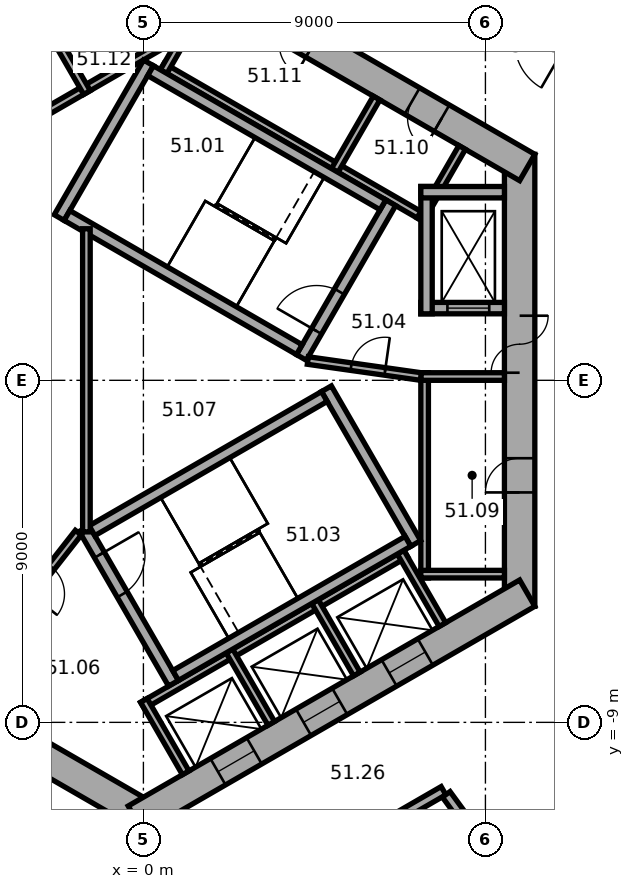
"""IFC4 building model, lengths in metres.
Left out: names, types, materials, properties, quantities, classifications, styles, units other than length and angle.
Written with IfcOpenShell. Run it as: python <this file> out.ifc"""

import sys

from ifc_helpers import new_model, si_unit, direction, frame, frame_2d, origin, place, context, subcontext, project, spatial, rectangle, extrude, element, fill, save


model = new_model("IFC4")
c1 = context("Model", 3, precision=1e-05, world=origin(), true_north=direction((0.0, 1.0)))
c2 = subcontext(c1, "Body", "Model", "MODEL_VIEW")
j1 = project(units=[si_unit("LENGTHUNIT", "METRE"), si_unit("PLANEANGLEUNIT", "RADIAN")], contexts=[c1])
p1 = place(None, origin())
s1 = spatial("IfcSite", under=j1, at=p1, CompositionType="ELEMENT")
p2 = place(p1, origin())
s2 = spatial("IfcBuilding", under=s1, at=p2, CompositionType="ELEMENT")
p3 = place(p2, frame((0.0, 0.0, 205.8)))
s3 = spatial("IfcBuildingStorey", under=s2, at=p3, CompositionType="ELEMENT", Elevation=205.8)
p4 = place(p3, frame((9.9, -5.947, 0.0), z_axis=(0.0, 0.0, 1.0), x_axis=(0.0, 1.0, 0.0)))
e1 = element("IfcWall", 1, at=p4, inside=s3, PredefinedType="SHEAR", context=c2, shape_type="SweptSolid", body=[
    extrude(rectangle(XDim=11.894, YDim=0.8, at=frame_2d((5.947, 0.0))), origin(), (0.0, 0.0, 1.0), 4.8),
])
p5 = place(p4, frame((6.147, 0.0, 0.0)))
e2 = element("IfcOpeningElement", 2, at=p5, cuts=e1, PredefinedType="OPENING", context=c2, shape_type="SweptSolid", body=[
    extrude(rectangle(XDim=1.5, YDim=2.1, at=frame_2d((0.75, 1.05))), frame((0.0, 0.41, 0.0), z_axis=(0.0, -1.0, 0.0), x_axis=(1.0, 0.0, 0.0)), (0.0, 0.0, 1.0), 0.82),
])
p6 = place(p4, frame((2.997, 0.0, 0.0)))
e3 = element("IfcOpeningElement", 3, at=p6, cuts=e1, PredefinedType="OPENING", context=c2, shape_type="SweptSolid", body=[
    extrude(rectangle(XDim=0.9, YDim=2.1, at=frame_2d((0.45, 1.05))), frame((0.0, 0.41, 0.0), z_axis=(0.0, -1.0, 0.0), x_axis=(1.0, 0.0, 0.0)), (0.0, 0.0, 1.0), 0.82),
])
p7 = place(p3, frame((10.1, 5.6, 0.0), z_axis=(0.0, 0.0, 1.0), x_axis=(-0.866023897231, 0.500002609418, 0.0)))
e4 = element("IfcWall", 4, at=p7, inside=s3, PredefinedType="SHEAR", context=c2, shape_type="SweptSolid", body=[
    extrude(rectangle(XDim=11.894, YDim=0.8, at=frame_2d((5.947, 0.0))), origin(), (0.0, 0.0, 1.0), 4.8),
])
p8 = place(p7, frame((2.597, 0.0, 0.0)))
e5 = element("IfcOpeningElement", 5, at=p8, cuts=e4, PredefinedType="OPENING", context=c2, shape_type="SweptSolid", body=[
    extrude(rectangle(XDim=0.9, YDim=2.1, at=frame_2d((0.45, 1.05))), frame((0.0, 0.41, 0.0), z_axis=(0.0, -1.0, 0.0), x_axis=(1.0, 0.0, 0.0)), (0.0, 0.0, 1.0), 0.82),
])
p9 = place(p7, frame((6.497, 0.0, 0.0)))
e6 = element("IfcOpeningElement", 6, at=p9, cuts=e4, PredefinedType="OPENING", context=c2, shape_type="SweptSolid", body=[
    extrude(rectangle(XDim=0.9, YDim=2.1, at=frame_2d((0.45, 1.05))), frame((0.0, 0.41, 0.0), z_axis=(0.0, -1.0, 0.0), x_axis=(1.0, 0.0, 0.0)), (0.0, 0.0, 1.0), 0.82),
])
p10 = place(p3, frame((0.2, 11.547, 0.0), z_axis=(0.0, 0.0, 1.0), x_axis=(-0.866023897231, -0.500002609418, 0.0)))
e7 = element("IfcWall", 7, at=p10, inside=s3, PredefinedType="SHEAR", context=c2, shape_type="SweptSolid", body=[
    extrude(rectangle(XDim=11.894, YDim=0.8, at=frame_2d((5.947, 0.0))), origin(), (0.0, 0.0, 1.0), 4.8),
])
p11 = place(p10, frame((6.147, 0.0, 0.0)))
e8 = element("IfcOpeningElement", 8, at=p11, cuts=e7, PredefinedType="OPENING", context=c2, shape_type="SweptSolid", body=[
    extrude(rectangle(XDim=1.5, YDim=2.1, at=frame_2d((0.75, 1.05))), frame((0.0, 0.41, 0.0), z_axis=(0.0, -1.0, 0.0), x_axis=(1.0, 0.0, 0.0)), (0.0, 0.0, 1.0), 0.82),
])
p12 = place(p10, frame((1.697, 0.0, 0.0)))
e9 = element("IfcOpeningElement", 9, at=p12, cuts=e7, PredefinedType="OPENING", context=c2, shape_type="SweptSolid", body=[
    extrude(rectangle(XDim=0.9, YDim=2.1, at=frame_2d((0.45, 1.05))), frame((0.0, 0.41, 0.0), z_axis=(0.0, -1.0, 0.0), x_axis=(1.0, 0.0, 0.0)), (0.0, 0.0, 1.0), 0.82),
])
p13 = place(p10, frame((4.297, 0.0, 0.0)))
e10 = element("IfcOpeningElement", 10, at=p13, cuts=e7, PredefinedType="OPENING", context=c2, shape_type="SweptSolid", body=[
    extrude(rectangle(XDim=0.9, YDim=2.1, at=frame_2d((0.45, 1.05))), frame((0.0, 0.41, 0.0), z_axis=(0.0, -1.0, 0.0), x_axis=(1.0, 0.0, 0.0)), (0.0, 0.0, 1.0), 0.82),
])
p14 = place(p3, frame((-10.1, -5.6, 0.0), z_axis=(0.0, 0.0, 1.0), x_axis=(0.866023897231, -0.500002609418, 0.0)))
e11 = element("IfcWall", 11, at=p14, inside=s3, PredefinedType="SHEAR", context=c2, shape_type="SweptSolid", body=[
    extrude(rectangle(XDim=11.894, YDim=0.8, at=frame_2d((5.947, 0.0))), origin(), (0.0, 0.0, 1.0), 4.8),
])
p15 = place(p14, frame((6.147, 0.0, 0.0)))
e12 = element("IfcOpeningElement", 12, at=p15, cuts=e11, PredefinedType="OPENING", context=c2, shape_type="SweptSolid", body=[
    extrude(rectangle(XDim=1.5, YDim=2.1, at=frame_2d((0.75, 1.05))), frame((0.0, 0.41, 0.0), z_axis=(0.0, -1.0, 0.0), x_axis=(1.0, 0.0, 0.0)), (0.0, 0.0, 1.0), 0.82),
])
p16 = place(p14, frame((1.597, 0.0, 0.0)))
e13 = element("IfcOpeningElement", 13, at=p16, cuts=e11, PredefinedType="OPENING", context=c2, shape_type="SweptSolid", body=[
    extrude(rectangle(XDim=1.1, YDim=2.1, at=frame_2d((0.55, 1.05))), frame((0.0, 0.41, 0.0), z_axis=(0.0, -1.0, 0.0), x_axis=(1.0, 0.0, 0.0)), (0.0, 0.0, 1.0), 0.82),
])
p17 = place(p14, frame((4.197, 0.0, 0.0)))
e14 = element("IfcOpeningElement", 14, at=p17, cuts=e11, PredefinedType="OPENING", context=c2, shape_type="SweptSolid", body=[
    extrude(rectangle(XDim=1.1, YDim=2.1, at=frame_2d((0.55, 1.05))), frame((0.0, 0.41, 0.0), z_axis=(0.0, -1.0, 0.0), x_axis=(1.0, 0.0, 0.0)), (0.0, 0.0, 1.0), 0.82),
])
p18 = place(p3, frame((-0.2, -11.547, 0.0), z_axis=(0.0, 0.0, 1.0), x_axis=(0.866023897231, 0.500002609418, 0.0)))
e15 = element("IfcWall", 15, at=p18, inside=s3, PredefinedType="SHEAR", context=c2, shape_type="SweptSolid", body=[
    extrude(rectangle(XDim=11.894, YDim=0.8, at=frame_2d((5.947, 0.0))), origin(), (0.0, 0.0, 1.0), 4.8),
])
p19 = place(p18, frame((2.497, 0.0, 0.0)))
e16 = element("IfcOpeningElement", 16, at=p19, cuts=e15, PredefinedType="OPENING", context=c2, shape_type="SweptSolid", body=[
    extrude(rectangle(XDim=1.1, YDim=2.1, at=frame_2d((0.55, 1.05))), frame((0.0, 0.41, 0.0), z_axis=(0.0, -1.0, 0.0), x_axis=(1.0, 0.0, 0.0)), (0.0, 0.0, 1.0), 0.82),
])
p20 = place(p18, frame((5.097, 0.0, 0.0)))
e17 = element("IfcOpeningElement", 17, at=p20, cuts=e15, PredefinedType="OPENING", context=c2, shape_type="SweptSolid", body=[
    extrude(rectangle(XDim=1.1, YDim=2.1, at=frame_2d((0.55, 1.05))), frame((0.0, 0.41, 0.0), z_axis=(0.0, -1.0, 0.0), x_axis=(1.0, 0.0, 0.0)), (0.0, 0.0, 1.0), 0.82),
])
p21 = place(p18, frame((7.697, 0.0, 0.0)))
e18 = element("IfcOpeningElement", 18, at=p21, cuts=e15, PredefinedType="OPENING", context=c2, shape_type="SweptSolid", body=[
    extrude(rectangle(XDim=1.1, YDim=2.1, at=frame_2d((0.55, 1.05))), frame((0.0, 0.41, 0.0), z_axis=(0.0, -1.0, 0.0), x_axis=(1.0, 0.0, 0.0)), (0.0, 0.0, 1.0), 0.82),
])
p22 = place(p3, frame((7.4, -5.2, 0.0), z_axis=(0.0, 0.0, 1.0), x_axis=(0.0, 1.0, 0.0)))
e19 = element("IfcWall", 19, at=p22, inside=s3, PredefinedType="PARTITIONING", context=c2, shape_type="SweptSolid", body=[
    extrude(rectangle(XDim=5.4, YDim=0.2, at=frame_2d((2.7, 0.0))), origin(), (0.0, 0.0, 1.0), 4.52),
])
for number, where, z_axis, x_axis in (
    (20, (7.3, -5.1, 0.0), (0.0, 0.0, 1.0), (1.0, 0.0, 0.0)),
    (21, (7.3, 0.1, 0.0), (0.0, 0.0, 1.0), (1.0, 0.0, 0.0)),
):
    element("IfcWall", number, at=place(p3, frame(where, z_axis=z_axis, x_axis=x_axis)), inside=s3, PredefinedType="PARTITIONING", context=c2, shape_type="SweptSolid", body=[
        extrude(rectangle(XDim=2.2, YDim=0.2, at=frame_2d((1.1, 0.0))), origin(), (0.0, 0.0, 1.0), 4.52),
    ])
p23 = place(p3, frame((7.424, 4.259, 0.0), z_axis=(0.0, 0.0, 1.0), x_axis=(-0.866026010844, 0.49999894854, 0.0)))
e22 = element("IfcWall", 22, at=p23, inside=s3, PredefinedType="PARTITIONING", context=c2, shape_type="SweptSolid", body=[
    extrude(rectangle(XDim=8.0, YDim=0.2, at=frame_2d((4.0, 0.0))), origin(), (0.0, 0.0, 1.0), 4.52),
])
for number, where, z_axis, x_axis in (
    (23, (7.287, 4.222, 0.0), (0.0, 0.0, 1.0), (0.5, 0.866, 0.0)),
    (24, (5.036, 5.522, 0.0), (0.0, 0.0, 1.0), (0.5, 0.866, 0.0)),
    (25, (0.532, 8.122, 0.0), (0.0, 0.0, 1.0), (0.5, 0.866, 0.0)),
):
    element("IfcWall", number, at=place(p3, frame(where, z_axis=z_axis, x_axis=x_axis)), inside=s3, PredefinedType="PARTITIONING", context=c2, shape_type="SweptSolid", body=[
        extrude(rectangle(XDim=2.2, YDim=0.2, at=frame_2d((1.1, 0.0))), origin(), (0.0, 0.0, 1.0), 4.52),
    ])
p24 = place(p3, frame((0.803, 9.009, 0.0), z_axis=(0.0, 0.0, 1.0), x_axis=(-0.866028230842, -0.499995103361, 0.0)))
e26 = element("IfcWall", 26, at=p24, inside=s3, PredefinedType="PARTITIONING", context=c2, shape_type="SweptSolid", body=[
    extrude(rectangle(XDim=5.4, YDim=0.2, at=frame_2d((2.7, 0.0))), origin(), (0.0, 0.0, 1.0), 4.52),
])
p25 = place(p3, frame((-1.485, 7.572, 0.0), z_axis=(0.0, 0.0, 1.0), x_axis=(-0.50002983664, 0.866008176907, 0.0)))
e27 = element("IfcWall", 27, at=p25, inside=s3, PredefinedType="PARTITIONING", context=c2, shape_type="SweptSolid", body=[
    extrude(rectangle(XDim=2.2, YDim=0.2, at=frame_2d((1.1, 0.0))), origin(), (0.0, 0.0, 1.0), 4.52),
])
p26 = place(p3, frame((-0.024, -8.559, 0.0), z_axis=(0.0, 0.0, 1.0), x_axis=(0.866026010844, 0.49999894854, 0.0)))
e28 = element("IfcWall", 28, at=p26, inside=s3, PredefinedType="PARTITIONING", context=c2, shape_type="SweptSolid", body=[
    extrude(rectangle(XDim=8.0, YDim=0.2, at=frame_2d((4.0, 0.0))), origin(), (0.0, 0.0, 1.0), 4.52),
])
for number, where, z_axis, x_axis in (
    (29, (0.013, -8.422, 0.0), (0.0, 0.0, 1.0), (0.5, -0.866, 0.0)),
    (30, (2.264, -7.122, 0.0), (0.0, 0.0, 1.0), (0.5, -0.866, 0.0)),
    (31, (4.516, -5.822, 0.0), (0.0, 0.0, 1.0), (0.5, -0.866, 0.0)),
    (32, (6.768, -4.522, 0.0), (0.0, 0.0, 1.0), (0.5, -0.866, 0.0)),
):
    element("IfcWall", number, at=place(p3, frame(where, z_axis=z_axis, x_axis=x_axis)), inside=s3, PredefinedType="PARTITIONING", context=c2, shape_type="SweptSolid", body=[
        extrude(rectangle(XDim=2.2, YDim=0.2, at=frame_2d((1.1, 0.0))), origin(), (0.0, 0.0, 1.0), 4.52),
    ])
p27 = place(p3, frame((4.158, 0.602, 0.0), z_axis=(0.0, 0.0, 1.0), x_axis=(0.499977259774, 0.866038532462, 0.0)))
e33 = element("IfcWall", 33, at=p27, inside=s3, PredefinedType="SHEAR", context=c2, shape_type="SweptSolid", body=[
    extrude(rectangle(XDim=4.7, YDim=0.3, at=frame_2d((2.35, 0.0))), origin(), (0.0, 0.0, 1.0), 4.52),
])
p28 = place(p27, frame((0.8, 0.0, 0.0)))
e34 = element("IfcOpeningElement", 34, at=p28, cuts=e33, PredefinedType="OPENING", context=c2, shape_type="SweptSolid", body=[
    extrude(rectangle(XDim=1.2, YDim=2.1, at=frame_2d((0.6, 1.05))), frame((0.0, 0.16, 0.0), z_axis=(0.0, -1.0, 0.0), x_axis=(1.0, 0.0, 0.0)), (0.0, 0.0, 1.0), 0.32),
])
p29 = place(p3, frame((-2.216, 4.282, 0.0), z_axis=(0.0, 0.0, 1.0), x_axis=(0.499977259774, 0.866038532462, 0.0)))
e35 = element("IfcWall", 35, at=p29, inside=s3, PredefinedType="SHEAR", context=c2, shape_type="SweptSolid", body=[
    extrude(rectangle(XDim=4.7, YDim=0.3, at=frame_2d((2.35, 0.0))), origin(), (0.0, 0.0, 1.0), 4.52),
])
for number, where, z_axis, x_axis in (
    (36, (4.103, 0.807, 0.0), (0.0, 0.0, 1.0), (-0.866, 0.5, 0.0)),
    (37, (6.303, 4.617, 0.0), (0.0, 0.0, 1.0), (-0.866, 0.5, 0.0)),
):
    element("IfcWall", number, at=place(p3, frame(where, z_axis=z_axis, x_axis=x_axis)), inside=s3, PredefinedType="SHEAR", context=c2, shape_type="SweptSolid", body=[
        extrude(rectangle(XDim=7.06, YDim=0.3, at=frame_2d((3.53, 0.0))), origin(), (0.0, 0.0, 1.0), 4.52),
    ])
p30 = place(p3, frame((-1.558, -3.902, 0.0), z_axis=(0.0, 0.0, 1.0), x_axis=(0.499977259774, -0.866038532462, 0.0)))
e38 = element("IfcWall", 38, at=p30, inside=s3, PredefinedType="SHEAR", context=c2, shape_type="SweptSolid", body=[
    extrude(rectangle(XDim=4.7, YDim=0.3, at=frame_2d((2.35, 0.0))), origin(), (0.0, 0.0, 1.0), 4.52),
])
p31 = place(p30, frame((0.8, 0.0, 0.0)))
e39 = element("IfcOpeningElement", 39, at=p31, cuts=e38, PredefinedType="OPENING", context=c2, shape_type="SweptSolid", body=[
    extrude(rectangle(XDim=1.2, YDim=2.1, at=frame_2d((0.6, 1.05))), frame((0.0, 0.16, 0.0), z_axis=(0.0, -1.0, 0.0), x_axis=(1.0, 0.0, 0.0)), (0.0, 0.0, 1.0), 0.32),
])
p32 = place(p3, frame((4.816, -0.222, 0.0), z_axis=(0.0, 0.0, 1.0), x_axis=(0.499977259774, -0.866038532462, 0.0)))
e40 = element("IfcWall", 40, at=p32, inside=s3, PredefinedType="SHEAR", context=c2, shape_type="SweptSolid", body=[
    extrude(rectangle(XDim=4.7, YDim=0.3, at=frame_2d((2.35, 0.0))), origin(), (0.0, 0.0, 1.0), 4.52),
])
for number, where, z_axis, x_axis in (
    (41, (-1.353, -3.957, 0.0), (0.0, 0.0, 1.0), (0.866, 0.5, 0.0)),
    (42, (0.847, -7.767, 0.0), (0.0, 0.0, 1.0), (0.866, 0.5, 0.0)),
):
    element("IfcWall", number, at=place(p3, frame(where, z_axis=z_axis, x_axis=x_axis)), inside=s3, PredefinedType="SHEAR", context=c2, shape_type="SweptSolid", body=[
        extrude(rectangle(XDim=7.06, YDim=0.3, at=frame_2d((3.53, 0.0))), origin(), (0.0, 0.0, 1.0), 4.52),
    ])
p33 = place(p3, frame((7.3, 1.9, 0.0), z_axis=(0.0, 0.0, 1.0), x_axis=(1.0, 0.0, 0.0)))
e43 = element("IfcWall", 43, at=p33, inside=s3, PredefinedType="SHEAR", context=c2, shape_type="SweptSolid", body=[
    extrude(rectangle(XDim=2.2, YDim=0.3, at=frame_2d((1.1, 0.0))), origin(), (0.0, 0.0, 1.0), 4.52),
])
p34 = place(p33, frame((0.7, 0.0, 0.0)))
e44 = element("IfcOpeningElement", 44, at=p34, cuts=e43, PredefinedType="OPENING", context=c2, shape_type="SweptSolid", body=[
    extrude(rectangle(XDim=1.1, YDim=2.1, at=frame_2d((0.55, 1.05))), frame((0.0, 0.16, 0.0), z_axis=(0.0, -1.0, 0.0), x_axis=(1.0, 0.0, 0.0)), (0.0, 0.0, 1.0), 0.32),
])
p35 = place(p3, frame((7.45, 1.75, 0.0), z_axis=(0.0, 0.0, 1.0), x_axis=(0.0, 1.0, 0.0)))
e45 = element("IfcWall", 45, at=p35, inside=s3, PredefinedType="SHEAR", context=c2, shape_type="SweptSolid", body=[
    extrude(rectangle(XDim=3.35, YDim=0.3, at=frame_2d((1.675, 0.0))), origin(), (0.0, 0.0, 1.0), 4.52),
])
p36 = place(p3, frame((7.3, 4.95, 0.0), z_axis=(0.0, 0.0, 1.0), x_axis=(1.0, 0.0, 0.0)))
e46 = element("IfcWall", 46, at=p36, inside=s3, PredefinedType="SHEAR", context=c2, shape_type="SweptSolid", body=[
    extrude(rectangle(XDim=2.2, YDim=0.3, at=frame_2d((1.1, 0.0))), origin(), (0.0, 0.0, 1.0), 4.52),
])
p37 = place(p3, frame((4.327, 0.521, 0.0), z_axis=(0.0, 0.0, 1.0), x_axis=(0.990124376366, -0.14019172346, 0.0)))
e47 = element("IfcWall", 47, at=p37, inside=s3, PredefinedType="PARTITIONING", context=c2, shape_type="SweptSolid", body=[
    extrude(rectangle(XDim=3.002, YDim=0.2, at=frame_2d((1.501, 0.0))), origin(), (0.0, 0.0, 1.0), 4.52),
])
p38 = place(p37, frame((1.15, 0.0, 0.0)))
e48 = element("IfcOpeningElement", 48, at=p38, cuts=e47, PredefinedType="OPENING", context=c2, shape_type="SweptSolid", body=[
    extrude(rectangle(XDim=0.9, YDim=2.1, at=frame_2d((0.45, 1.05))), frame((0.0, 0.11, 0.0), z_axis=(0.0, -1.0, 0.0), x_axis=(1.0, 0.0, 0.0)), (0.0, 0.0, 1.0), 0.22),
])
p39 = place(p3, frame((-1.712, -4.008, 0.0), z_axis=(0.0, 0.0, 1.0), x_axis=(-0.616549420702, -0.787316208287, 0.0)))
e49 = element("IfcWall", 49, at=p39, inside=s3, PredefinedType="PARTITIONING", context=c2, shape_type="SweptSolid", body=[
    extrude(rectangle(XDim=3.002, YDim=0.2, at=frame_2d((1.501, 0.0))), origin(), (0.0, 0.0, 1.0), 4.52),
])
p40 = place(p39, frame((1.15, 0.0, 0.0)))
e50 = element("IfcOpeningElement", 50, at=p40, cuts=e49, PredefinedType="OPENING", context=c2, shape_type="SweptSolid", body=[
    extrude(rectangle(XDim=0.9, YDim=2.1, at=frame_2d((0.45, 1.05))), frame((0.0, 0.11, 0.0), z_axis=(0.0, -1.0, 0.0), x_axis=(1.0, 0.0, 0.0)), (0.0, 0.0, 1.0), 0.22),
])
p41 = place(p3, frame((-1.5, -3.988, 0.0), z_axis=(0.0, 0.0, 1.0), x_axis=(0.0, 1.0, 0.0)))
e51 = element("IfcWall", 51, at=p41, inside=s3, PredefinedType="PARTITIONING", context=c2, shape_type="SweptSolid", body=[
    extrude(rectangle(XDim=7.977, YDim=0.2, at=frame_2d((3.988, 0.0))), origin(), (0.0, 0.0, 1.0), 4.52),
])
p42 = place(p3, frame((4.99, -12.476, 0.0), z_axis=(0.0, 0.0, 1.0), x_axis=(0.86607294768, 0.499917642513, 0.0)))
e52 = element("IfcWall", 52, at=p42, inside=s3, PredefinedType="SOLIDWALL", context=c2, shape_type="SweptSolid", body=[
    extrude(rectangle(XDim=3.356, YDim=0.25, at=frame_2d((1.678, 0.0))), origin(), (0.0, 0.0, 1.0), 4.52),
])
p43 = place(p3, frame((7.968, -10.895, 0.0), z_axis=(0.0, 0.0, 1.0), x_axis=(0.590348117022, -0.807148747585, 0.0)))
e53 = element("IfcWall", 53, at=p43, inside=s3, PredefinedType="SOLIDWALL", context=c2, shape_type="SweptSolid", body=[
    extrude(rectangle(XDim=4.504, YDim=0.25, at=frame_2d((2.252, 0.0))), origin(), (0.0, 0.0, 1.0), 3.6),
])
p44 = place(p5, origin())
e54 = element("IfcDoor", 54, at=p44, inside=s3, OperationType="DOUBLE_DOOR_SINGLE_SWING", PredefinedType="DOOR", context=c2, shape_type="SweptSolid", body=[
    extrude(rectangle(XDim=1.5, YDim=2.1, at=frame_2d((0.75, 1.05))), frame((0.0, 0.025, 0.0), z_axis=(0.0, -1.0, 0.0), x_axis=(1.0, 0.0, 0.0)), (0.0, 0.0, 1.0), 0.05),
])
fill(e2, e54)
p45 = place(p28, origin())
e55 = element("IfcDoor", 55, at=p45, inside=s3, OperationType="SINGLE_SWING_RIGHT", PredefinedType="DOOR", context=c2, shape_type="SweptSolid", body=[
    extrude(rectangle(XDim=1.2, YDim=2.1, at=frame_2d((0.6, 1.05))), frame((0.0, 0.025, 0.0), z_axis=(0.0, -1.0, 0.0), x_axis=(1.0, 0.0, 0.0)), (0.0, 0.0, 1.0), 0.05),
])
fill(e34, e55)
p46 = place(p31, origin())
e56 = element("IfcDoor", 56, at=p46, inside=s3, OperationType="SINGLE_SWING_RIGHT", PredefinedType="DOOR", context=c2, shape_type="SweptSolid", body=[
    extrude(rectangle(XDim=1.2, YDim=2.1, at=frame_2d((0.6, 1.05))), frame((0.0, 0.025, 0.0), z_axis=(0.0, -1.0, 0.0), x_axis=(1.0, 0.0, 0.0)), (0.0, 0.0, 1.0), 0.05),
])
fill(e39, e56)
p47 = place(p38, origin())
e57 = element("IfcDoor", 57, at=p47, inside=s3, OperationType="SINGLE_SWING_LEFT", PredefinedType="DOOR", context=c2, shape_type="SweptSolid", body=[
    extrude(rectangle(XDim=0.9, YDim=2.1, at=frame_2d((0.45, 1.05))), frame((0.0, 0.025, 0.0), z_axis=(0.0, -1.0, 0.0), x_axis=(1.0, 0.0, 0.0)), (0.0, 0.0, 1.0), 0.05),
])
fill(e48, e57)
p48 = place(p6, origin())
e58 = element("IfcDoor", 58, at=p48, inside=s3, OperationType="SINGLE_SWING_LEFT", PredefinedType="DOOR", context=c2, shape_type="SweptSolid", body=[
    extrude(rectangle(XDim=0.9, YDim=2.1, at=frame_2d((0.45, 1.05))), frame((0.0, 0.025, 0.0), z_axis=(0.0, -1.0, 0.0), x_axis=(1.0, 0.0, 0.0)), (0.0, 0.0, 1.0), 0.05),
])
fill(e3, e58)
p49 = place(p8, origin())
e59 = element("IfcDoor", 59, at=p49, inside=s3, OperationType="SINGLE_SWING_LEFT", PredefinedType="DOOR", context=c2, shape_type="SweptSolid", body=[
    extrude(rectangle(XDim=0.9, YDim=2.1, at=frame_2d((0.45, 1.05))), frame((0.0, 0.025, 0.0), z_axis=(0.0, -1.0, 0.0), x_axis=(1.0, 0.0, 0.0)), (0.0, 0.0, 1.0), 0.05),
])
fill(e5, e59)
p50 = place(p34, origin())
e60 = element("IfcDoor", 60, at=p50, inside=s3, OperationType="DOUBLE_DOOR_SLIDING", PredefinedType="DOOR", context=c2, shape_type="SweptSolid", body=[
    extrude(rectangle(XDim=1.1, YDim=2.1, at=frame_2d((0.55, 1.05))), frame((0.0, 0.025, 0.0), z_axis=(0.0, -1.0, 0.0), x_axis=(1.0, 0.0, 0.0)), (0.0, 0.0, 1.0), 0.05),
])
fill(e44, e60)
p51 = place(p19, origin())
e61 = element("IfcDoor", 61, at=p51, inside=s3, OperationType="DOUBLE_DOOR_SLIDING", PredefinedType="DOOR", context=c2, shape_type="SweptSolid", body=[
    extrude(rectangle(XDim=1.1, YDim=2.1, at=frame_2d((0.55, 1.05))), frame((0.0, 0.025, 0.0), z_axis=(0.0, -1.0, 0.0), x_axis=(1.0, 0.0, 0.0)), (0.0, 0.0, 1.0), 0.05),
])
fill(e16, e61)
p52 = place(p20, origin())
e62 = element("IfcDoor", 62, at=p52, inside=s3, OperationType="DOUBLE_DOOR_SLIDING", PredefinedType="DOOR", context=c2, shape_type="SweptSolid", body=[
    extrude(rectangle(XDim=1.1, YDim=2.1, at=frame_2d((0.55, 1.05))), frame((0.0, 0.025, 0.0), z_axis=(0.0, -1.0, 0.0), x_axis=(1.0, 0.0, 0.0)), (0.0, 0.0, 1.0), 0.05),
])
fill(e17, e62)
p53 = place(p21, origin())
e63 = element("IfcDoor", 63, at=p53, inside=s3, OperationType="DOUBLE_DOOR_SLIDING", PredefinedType="DOOR", context=c2, shape_type="SweptSolid", body=[
    extrude(rectangle(XDim=1.1, YDim=2.1, at=frame_2d((0.55, 1.05))), frame((0.0, 0.025, 0.0), z_axis=(0.0, -1.0, 0.0), x_axis=(1.0, 0.0, 0.0)), (0.0, 0.0, 1.0), 0.05),
])
fill(e18, e63)
save(model, sys.argv[1])
